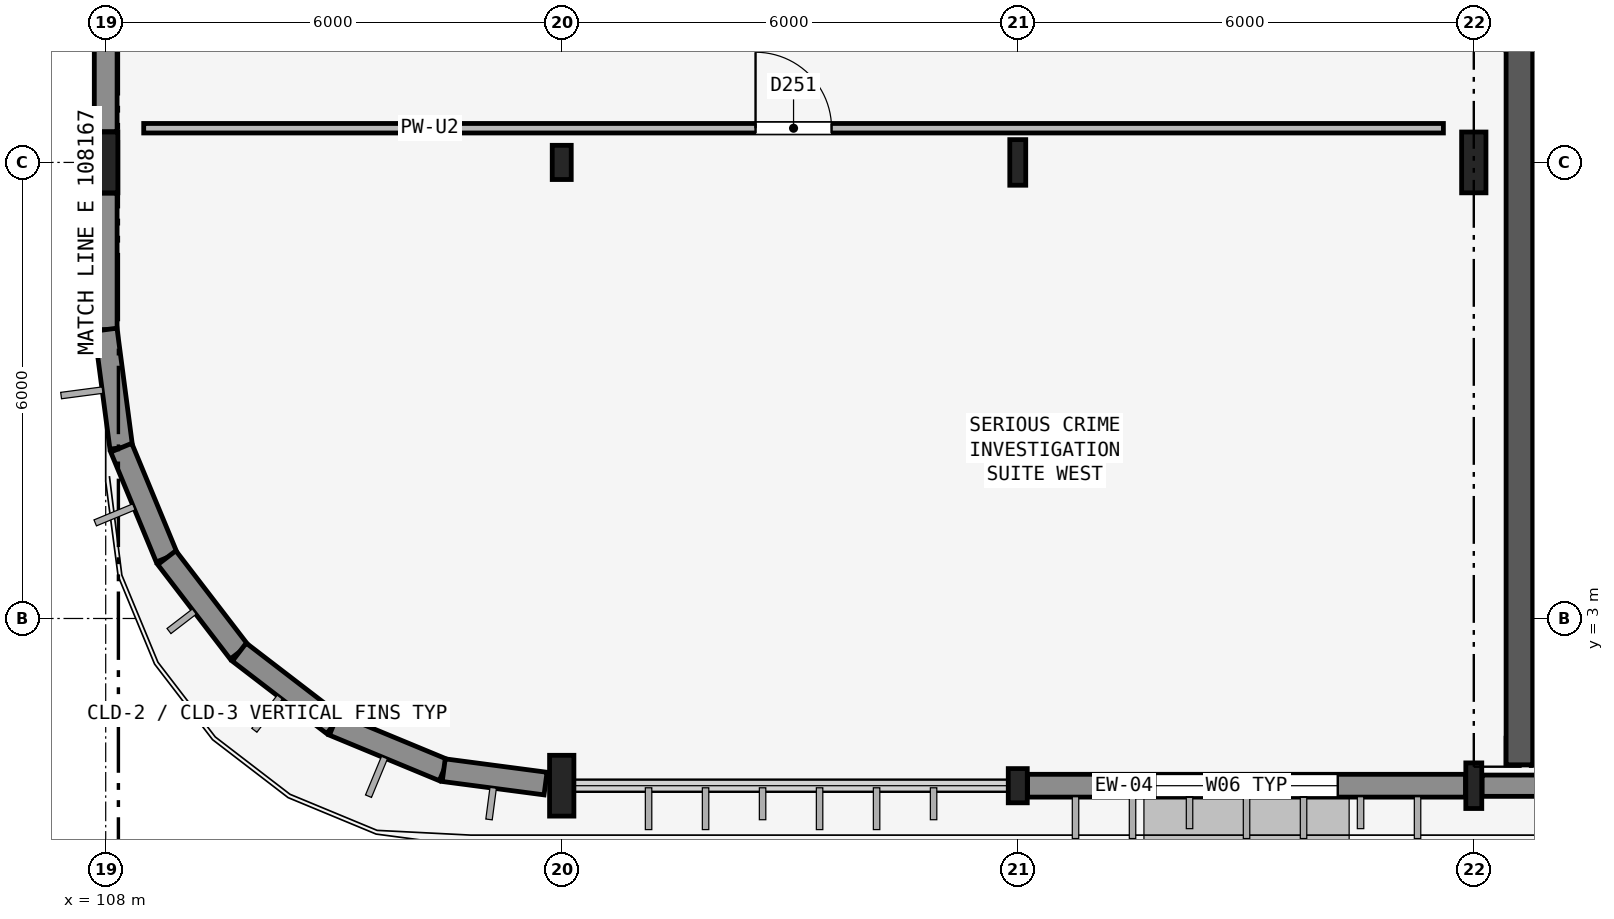
"""IFC4 building model, lengths in metres.
Left out: names, types, materials, properties, quantities, classifications, styles, units other than length and angle.
Written with IfcOpenShell. Run it as: python <this file> out.ifc"""

import sys

from ifc_helpers import new_model, si_unit, direction, frame, frame_2d, origin, origin_2d, place, context, subcontext, project, spatial, rectangle, i_section, extrude, element, fill, save


model = new_model("IFC4")
c1 = context("Model", 3, precision=1e-05, world=origin(), true_north=direction((0.0, 1.0)))
c2 = subcontext(c1, "Body", "Model", "MODEL_VIEW")
j1 = project(units=[si_unit("LENGTHUNIT", "METRE"), si_unit("PLANEANGLEUNIT", "RADIAN")], contexts=[c1])
p1 = place(None, origin())
s1 = spatial("IfcSite", under=j1, at=p1, CompositionType="ELEMENT")
p2 = place(p1, origin())
s2 = spatial("IfcBuilding", under=s1, at=p2, CompositionType="ELEMENT")
p3 = place(p2, frame((0.0, 0.0, 13.5)))
s3 = spatial("IfcBuildingStorey", under=s2, at=p3, CompositionType="ELEMENT", Elevation=13.5)
for number, where, z_axis, x_axis in (
    (1, (108.0, 9.0, 0.0), (0.0, 0.0, 1.0), (1.0, 0.0, 0.0)),
    (2, (114.0, 0.8, 0.0), (0.0, 0.0, 1.0), (1.0, 0.0, 0.0)),
):
    element("IfcColumn", number, at=place(p3, frame(where, z_axis=z_axis, x_axis=x_axis)), inside=s3, PredefinedType="COLUMN", context=c2, shape_type="SweptSolid", body=[
        extrude(i_section(OverallWidth=0.32, OverallDepth=0.8, WebThickness=0.016, FlangeThickness=0.028, at=origin_2d()), origin(), (0.0, 0.0, 1.0), 4.5),
    ])
for number, where, z_axis, x_axis in (
    (3, (114.0, 9.0, 0.0), (0.0, 0.0, 1.0), (1.0, 0.0, 0.0)),
    (4, (120.0, 0.8, 0.0), (0.0, 0.0, 1.0), (1.0, 0.0, 0.0)),
):
    element("IfcColumn", number, at=place(p3, frame(where, z_axis=z_axis, x_axis=x_axis)), inside=s3, PredefinedType="COLUMN", context=c2, shape_type="SweptSolid", body=[
        extrude(i_section(OverallWidth=0.25, OverallDepth=0.45, WebThickness=0.011, FlangeThickness=0.014, FilletRadius=0.015, at=origin_2d()), origin(), (0.0, 0.0, 1.0), 4.5),
    ])
for number, where, z_axis, x_axis in (
    (5, (120.0, 9.0, 0.0), (0.0, 0.0, 1.0), (1.0, 0.0, 0.0)),
    (6, (126.0, 0.8, 0.0), (0.0, 0.0, 1.0), (1.0, 0.0, 0.0)),
):
    element("IfcColumn", number, at=place(p3, frame(where, z_axis=z_axis, x_axis=x_axis)), inside=s3, PredefinedType="COLUMN", context=c2, shape_type="SweptSolid", body=[
        extrude(i_section(OverallWidth=0.21, OverallDepth=0.6, WebThickness=0.012, FlangeThickness=0.021, FilletRadius=0.02, at=origin_2d()), origin(), (0.0, 0.0, 1.0), 4.5),
    ])
p4 = place(p3, frame((126.0, 9.0, 0.0), z_axis=(0.0, 0.0, 1.0), x_axis=(1.0, 0.0, 0.0)))
e7 = element("IfcColumn", 7, at=p4, inside=s3, PredefinedType="COLUMN", context=c2, shape_type="SweptSolid", body=[
    extrude(i_section(OverallWidth=0.32, OverallDepth=0.8, WebThickness=0.016, FlangeThickness=0.028, at=origin_2d()), origin(), (0.0, 0.0, 1.0), 4.5),
])
p5 = place(p3, frame((120.129, 0.8, 0.0), z_axis=(0.0, 0.0, 1.0), x_axis=(1.0, 0.0, 0.0)))
e8 = element("IfcWall", 8, at=p5, inside=s3, PredefinedType="SOLIDWALL", context=c2, shape_type="SweptSolid", body=[
    extrude(rectangle(XDim=5.762, YDim=0.3, at=frame_2d((2.881, 0.0))), origin(), (0.0, 0.0, 1.0), 3.84),
])
p6 = place(p5, frame((1.681, 0.0, 1.1)))
e9 = element("IfcOpeningElement", 9, at=p6, cuts=e8, PredefinedType="OPENING", context=c2, shape_type="SweptSolid", body=[
    extrude(rectangle(XDim=2.4, YDim=1.2, at=frame_2d((1.2, 0.6))), frame((0.0, 0.16, 0.0), z_axis=(0.0, -1.0, 0.0), x_axis=(1.0, 0.0, 0.0)), (0.0, 0.0, 1.0), 0.32),
])
p7 = place(p3, frame((126.109, 0.8, 0.0), z_axis=(0.0, 0.0, 1.0), x_axis=(1.0, 0.0, 0.0)))
e10 = element("IfcWall", 10, at=p7, inside=s3, PredefinedType="SOLIDWALL", context=c2, shape_type="SweptSolid", body=[
    extrude(rectangle(XDim=5.727, YDim=0.28, at=frame_2d((2.864, 0.0))), origin(), (0.0, 0.0, 1.0), 3.84),
])
p8 = place(p3, frame((108.0, 6.8, 0.0), z_axis=(0.0, 0.0, 1.0), x_axis=(0.0, 1.0, 0.0)))
e11 = element("IfcWall", 11, at=p8, inside=s3, PredefinedType="SOLIDWALL", context=c2, shape_type="SweptSolid", body=[
    extrude(rectangle(XDim=1.796, YDim=0.3, at=frame_2d((0.898, 0.0))), origin(), (0.0, 0.0, 1.0), 4.195),
])
p9 = place(p3, frame((108.0, 9.404, 0.0), z_axis=(0.0, 0.0, 1.0), x_axis=(0.0, 1.0, 0.0)))
e12 = element("IfcWall", 12, at=p9, inside=s3, PredefinedType="SOLIDWALL", context=c2, shape_type="SweptSolid", body=[
    extrude(rectangle(XDim=5.367, YDim=0.3, at=frame_2d((2.684, 0.0))), origin(), (0.0, 0.0, 1.0), 3.69),
])
p10 = place(p9, frame((1.634, 0.0, 0.9)))
e13 = element("IfcOpeningElement", 13, at=p10, cuts=e12, PredefinedType="OPENING", context=c2, shape_type="SweptSolid", body=[
    extrude(rectangle(XDim=2.1, YDim=1.5, at=frame_2d((1.05, 0.75))), frame((0.0, 0.16, 0.0), z_axis=(0.0, -1.0, 0.0), x_axis=(1.0, 0.0, 0.0)), (0.0, 0.0, 1.0), 0.32),
])
p11 = place(p3, frame((108.0, 6.8, 0.0), z_axis=(0.0, 0.0, 1.0), x_axis=(0.130458544462, -0.991453765022, 0.0)))
e14 = element("IfcWall", 14, at=p11, inside=s3, PredefinedType="SOLIDWALL", context=c2, shape_type="SweptSolid", body=[
    extrude(rectangle(XDim=1.566, YDim=0.3, at=frame_2d((0.783, 0.0))), origin(), (0.0, 0.0, 1.0), 4.195),
])
p12 = place(p3, frame((108.204, 5.247, 0.0), z_axis=(0.0, 0.0, 1.0), x_axis=(0.382677606907, -0.923881945474, 0.0)))
e15 = element("IfcWall", 15, at=p12, inside=s3, PredefinedType="SOLIDWALL", context=c2, shape_type="SweptSolid", body=[
    extrude(rectangle(XDim=1.566, YDim=0.3, at=frame_2d((0.783, 0.0))), origin(), (0.0, 0.0, 1.0), 4.195),
])
for number, where, z_axis, x_axis in (
    (16, (108.804, 3.8, 0.0), (0.0, 0.0, 1.0), (0.609, -0.793, 0.0)),
    (17, (109.757, 2.557, 0.0), (0.0, 0.0, 1.0), (0.793, -0.609, 0.0)),
):
    element("IfcWall", number, at=place(p3, frame(where, z_axis=z_axis, x_axis=x_axis)), inside=s3, PredefinedType="SOLIDWALL", context=c2, shape_type="SweptSolid", body=[
        extrude(rectangle(XDim=1.566, YDim=0.3, at=frame_2d((0.783, 0.0))), origin(), (0.0, 0.0, 1.0), 4.195),
    ])
p13 = place(p3, frame((111.0, 1.604, 0.0), z_axis=(0.0, 0.0, 1.0), x_axis=(0.923881945474, -0.382677606907, 0.0)))
e18 = element("IfcWall", 18, at=p13, inside=s3, PredefinedType="SOLIDWALL", context=c2, shape_type="SweptSolid", body=[
    extrude(rectangle(XDim=1.566, YDim=0.3, at=frame_2d((0.783, 0.0))), origin(), (0.0, 0.0, 1.0), 4.195),
])
p14 = place(p3, frame((112.447, 1.004, 0.0), z_axis=(0.0, 0.0, 1.0), x_axis=(0.991436457658, -0.130590008906, 0.0)))
e19 = element("IfcWall", 19, at=p14, inside=s3, PredefinedType="SOLIDWALL", context=c2, shape_type="SweptSolid", body=[
    extrude(rectangle(XDim=1.352, YDim=0.3, at=frame_2d((0.676, 0.0))), origin(), (0.0, 0.0, 1.0), 3.866),
])
p15 = place(p3, frame((126.425, 1.25, 0.0), z_axis=(0.0, 0.0, 1.0), x_axis=(1.0, 0.0, 0.0)))
e20 = element("IfcWall", 20, at=p15, inside=s3, PredefinedType="SHEAR", context=c2, shape_type="SweptSolid", body=[
    extrude(rectangle(XDim=5.15, YDim=0.35, at=frame_2d((2.575, 0.0))), origin(), (0.0, 0.0, 1.0), 4.36),
])
p16 = place(p3, frame((126.6, 10.825, 0.0), z_axis=(0.0, 0.0, 1.0), x_axis=(0.0, -1.0, 0.0)))
e21 = element("IfcWall", 21, at=p16, inside=s3, PredefinedType="SHEAR", context=c2, shape_type="SweptSolid", body=[
    extrude(rectangle(XDim=9.75, YDim=0.35, at=frame_2d((4.875, 0.0))), origin(), (0.0, 0.0, 1.0), 4.36),
])
p17 = place(p3, frame((108.5, 9.45, 0.0), z_axis=(0.0, 0.0, 1.0), x_axis=(1.0, 0.0, 0.0)))
e22 = element("IfcWall", 22, at=p17, inside=s3, PredefinedType="PARTITIONING", context=c2, shape_type="SweptSolid", body=[
    extrude(rectangle(XDim=17.1, YDim=0.125, at=frame_2d((8.55, 0.0))), origin(), (0.0, 0.0, 1.0), 3.69),
])
p18 = place(p17, frame((8.05, 0.0, 0.0)))
e23 = element("IfcOpeningElement", 23, at=p18, cuts=e22, PredefinedType="OPENING", context=c2, shape_type="SweptSolid", body=[
    extrude(rectangle(XDim=1.0, YDim=2.15, at=frame_2d((0.5, 1.075))), frame((0.0, 0.073, 0.0), z_axis=(0.0, -1.0, 0.0), x_axis=(1.0, 0.0, 0.0)), (0.0, 0.0, 1.0), 0.145),
])
p19 = place(p6, origin())
e24 = element("IfcWindow", 24, at=p19, inside=s3, PartitioningType="SINGLE_PANEL", PredefinedType="WINDOW", context=c2, shape_type="SweptSolid", body=[
    extrude(rectangle(XDim=2.4, YDim=1.2, at=frame_2d((1.2, 0.6))), frame((0.0, 0.03, 0.0), z_axis=(0.0, -1.0, 0.0), x_axis=(1.0, 0.0, 0.0)), (0.0, 0.0, 1.0), 0.06),
])
fill(e9, e24)
p20 = place(p18, origin())
e25 = element("IfcDoor", 25, at=p20, inside=s3, OperationType="SINGLE_SWING_LEFT", PredefinedType="DOOR", context=c2, shape_type="SweptSolid", body=[
    extrude(rectangle(XDim=1.0, YDim=2.15, at=frame_2d((0.5, 1.075))), frame((0.0, 0.025, 0.0), z_axis=(0.0, -1.0, 0.0), x_axis=(1.0, 0.0, 0.0)), (0.0, 0.0, 1.0), 0.05),
])
fill(e23, e25)
save(model, sys.argv[1])
